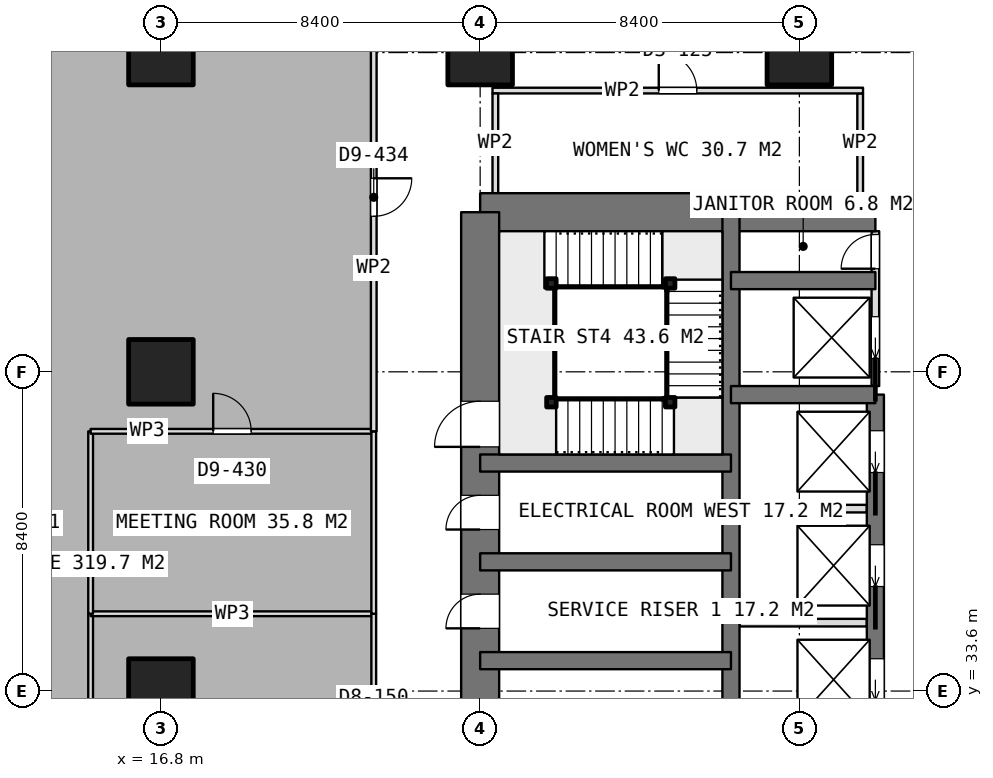
"""IFC4 building model, lengths in metres.
Left out: names, types, materials, properties, quantities, classifications, styles, units other than length and angle.
Written with IfcOpenShell. Run it as: python <this file> out.ifc"""

import sys

from ifc_helpers import new_model, si_unit, direction, frame, frame_2d, origin, origin_2d, place, context, subcontext, project, spatial, rectangle, extrude, element, fill, save


model = new_model("IFC4")
c1 = context("Model", 3, precision=1e-05, world=origin(), true_north=direction((0.0, 1.0)))
c2 = subcontext(c1, "Body", "Model", "MODEL_VIEW")
j1 = project(units=[si_unit("LENGTHUNIT", "METRE"), si_unit("PLANEANGLEUNIT", "RADIAN")], contexts=[c1])
p1 = place(None, origin())
s1 = spatial("IfcSite", under=j1, at=p1, CompositionType="ELEMENT")
p2 = place(p1, origin())
s2 = spatial("IfcBuilding", under=s1, at=p2, CompositionType="ELEMENT")
p3 = place(p2, frame((0.0, 0.0, 117.8)))
s3 = spatial("IfcBuildingStorey", under=s2, at=p3, CompositionType="ELEMENT", Elevation=117.8)
p4 = place(p3, frame((25.2, 46.2, 0.0), z_axis=(0.0, 0.0, 1.0), x_axis=(1.0, 0.0, 0.0)))
e1 = element("IfcWall", 1, at=p4, inside=s3, PredefinedType="SHEAR", context=c2, shape_type="SweptSolid", body=[
    extrude(rectangle(XDim=10.4, YDim=1.0, at=frame_2d((5.2, 0.0))), origin(), (0.0, 0.0, 1.0), 3.75),
])
p5 = place(p3, frame((25.2, 21.0, 0.0), z_axis=(0.0, 0.0, 1.0), x_axis=(0.0, 1.0, 0.0)))
e2 = element("IfcWall", 2, at=p5, inside=s3, PredefinedType="SHEAR", context=c2, shape_type="SweptSolid", body=[
    extrude(rectangle(XDim=25.2, YDim=1.0, at=frame_2d((12.6, 0.0))), origin(), (0.0, 0.0, 1.0), 3.75),
])
p6 = place(p5, frame((7.8, 0.0, 0.0)))
e3 = element("IfcOpeningElement", 3, at=p6, cuts=e2, PredefinedType="OPENING", context=c2, shape_type="SweptSolid", body=[
    extrude(rectangle(XDim=1.2, YDim=2.1, at=frame_2d((0.6, 1.05))), frame((0.0, 0.51, 0.0), z_axis=(0.0, -1.0, 0.0), x_axis=(1.0, 0.0, 0.0)), (0.0, 0.0, 1.0), 1.02),
])
p7 = place(p5, frame((14.25, 0.0, 0.0)))
e4 = element("IfcOpeningElement", 4, at=p7, cuts=e2, PredefinedType="OPENING", context=c2, shape_type="SweptSolid", body=[
    extrude(rectangle(XDim=0.9, YDim=2.1, at=frame_2d((0.45, 1.05))), frame((0.0, 0.51, 0.0), z_axis=(0.0, -1.0, 0.0), x_axis=(1.0, 0.0, 0.0)), (0.0, 0.0, 1.0), 1.02),
])
p8 = place(p5, frame((16.85, 0.0, 0.0)))
e5 = element("IfcOpeningElement", 5, at=p8, cuts=e2, PredefinedType="OPENING", context=c2, shape_type="SweptSolid", body=[
    extrude(rectangle(XDim=0.9, YDim=2.1, at=frame_2d((0.45, 1.05))), frame((0.0, 0.51, 0.0), z_axis=(0.0, -1.0, 0.0), x_axis=(1.0, 0.0, 0.0)), (0.0, 0.0, 1.0), 1.02),
])
p9 = place(p5, frame((19.025, 0.0, 0.0)))
e6 = element("IfcOpeningElement", 6, at=p9, cuts=e2, PredefinedType="OPENING", context=c2, shape_type="SweptSolid", body=[
    extrude(rectangle(XDim=1.2, YDim=2.1, at=frame_2d((0.6, 1.05))), frame((0.0, 0.51, 0.0), z_axis=(0.0, -1.0, 0.0), x_axis=(1.0, 0.0, 0.0)), (0.0, 0.0, 1.0), 1.02),
])
p10 = place(p3, frame((31.8, 21.0, 0.0), z_axis=(0.0, 0.0, 1.0), x_axis=(0.0, 1.0, 0.0)))
e7 = element("IfcWall", 7, at=p10, inside=s3, PredefinedType="SHEAR", context=c2, shape_type="SweptSolid", body=[
    extrude(rectangle(XDim=25.2, YDim=0.45, at=frame_2d((12.6, 0.0))), origin(), (0.0, 0.0, 1.0), 3.75),
])
p11 = place(p3, frame((35.6, 23.4, 0.0), z_axis=(0.0, 0.0, 1.0), x_axis=(0.0, 1.0, 0.0)))
e8 = element("IfcWall", 8, at=p11, inside=s3, PredefinedType="SHEAR", context=c2, shape_type="SweptSolid", body=[
    extrude(rectangle(XDim=18.0, YDim=0.45, at=frame_2d((9.0, 0.0))), origin(), (0.0, 0.0, 1.0), 3.75),
])
p12 = place(p11, frame((0.95, 0.0, 0.0)))
e9 = element("IfcOpeningElement", 9, at=p12, cuts=e8, PredefinedType="OPENING", context=c2, shape_type="SweptSolid", body=[
    extrude(rectangle(XDim=1.1, YDim=2.1, at=frame_2d((0.55, 1.05))), frame((0.0, 0.235, 0.0), z_axis=(0.0, -1.0, 0.0), x_axis=(1.0, 0.0, 0.0)), (0.0, 0.0, 1.0), 0.47),
])
p13 = place(p11, frame((3.95, 0.0, 0.0)))
e10 = element("IfcOpeningElement", 10, at=p13, cuts=e8, PredefinedType="OPENING", context=c2, shape_type="SweptSolid", body=[
    extrude(rectangle(XDim=1.1, YDim=2.1, at=frame_2d((0.55, 1.05))), frame((0.0, 0.235, 0.0), z_axis=(0.0, -1.0, 0.0), x_axis=(1.0, 0.0, 0.0)), (0.0, 0.0, 1.0), 0.47),
])
p14 = place(p11, frame((6.95, 0.0, 0.0)))
e11 = element("IfcOpeningElement", 11, at=p14, cuts=e8, PredefinedType="OPENING", context=c2, shape_type="SweptSolid", body=[
    extrude(rectangle(XDim=1.1, YDim=2.1, at=frame_2d((0.55, 1.05))), frame((0.0, 0.235, 0.0), z_axis=(0.0, -1.0, 0.0), x_axis=(1.0, 0.0, 0.0)), (0.0, 0.0, 1.0), 0.47),
])
p15 = place(p11, frame((9.95, 0.0, 0.0)))
e12 = element("IfcOpeningElement", 12, at=p15, cuts=e8, PredefinedType="OPENING", context=c2, shape_type="SweptSolid", body=[
    extrude(rectangle(XDim=1.1, YDim=2.1, at=frame_2d((0.55, 1.05))), frame((0.0, 0.235, 0.0), z_axis=(0.0, -1.0, 0.0), x_axis=(1.0, 0.0, 0.0)), (0.0, 0.0, 1.0), 0.47),
])
p16 = place(p11, frame((12.95, 0.0, 0.0)))
e13 = element("IfcOpeningElement", 13, at=p16, cuts=e8, PredefinedType="OPENING", context=c2, shape_type="SweptSolid", body=[
    extrude(rectangle(XDim=1.1, YDim=2.1, at=frame_2d((0.55, 1.05))), frame((0.0, 0.235, 0.0), z_axis=(0.0, -1.0, 0.0), x_axis=(1.0, 0.0, 0.0)), (0.0, 0.0, 1.0), 0.47),
])
p17 = place(p11, frame((15.95, 0.0, 0.0)))
e14 = element("IfcOpeningElement", 14, at=p17, cuts=e8, PredefinedType="OPENING", context=c2, shape_type="SweptSolid", body=[
    extrude(rectangle(XDim=1.1, YDim=2.1, at=frame_2d((0.55, 1.05))), frame((0.0, 0.235, 0.0), z_axis=(0.0, -1.0, 0.0), x_axis=(1.0, 0.0, 0.0)), (0.0, 0.0, 1.0), 0.47),
])
for number, where, z_axis, x_axis in (
    (15, (31.8, 41.4, 0.0), (0.0, 0.0, 1.0), (1.0, 0.0, 0.0)),
    (16, (31.8, 44.4, 0.0), (0.0, 0.0, 1.0), (1.0, 0.0, 0.0)),
):
    element("IfcWall", number, at=place(p3, frame(where, z_axis=z_axis, x_axis=x_axis)), inside=s3, PredefinedType="SHEAR", context=c2, shape_type="SweptSolid", body=[
        extrude(rectangle(XDim=3.8, YDim=0.45, at=frame_2d((1.9, 0.0))), origin(), (0.0, 0.0, 1.0), 3.75),
    ])
for number, where, z_axis, x_axis in (
    (17, (25.2, 34.4, 0.0), (0.0, 0.0, 1.0), (1.0, 0.0, 0.0)),
    (18, (25.2, 37.0, 0.0), (0.0, 0.0, 1.0), (1.0, 0.0, 0.0)),
    (19, (25.2, 39.6, 0.0), (0.0, 0.0, 1.0), (1.0, 0.0, 0.0)),
):
    element("IfcWall", number, at=place(p3, frame(where, z_axis=z_axis, x_axis=x_axis)), inside=s3, PredefinedType="SHEAR", context=c2, shape_type="SweptSolid", body=[
        extrude(rectangle(XDim=6.6, YDim=0.45, at=frame_2d((3.3, 0.0))), origin(), (0.0, 0.0, 1.0), 3.75),
    ])
for number, where, z_axis, x_axis in (
    (20, (16.8, 33.6, 0.0), (0.0, 0.0, 1.0), (1.0, 0.0, 0.0)),
    (21, (16.8, 42.0, 0.0), (0.0, 0.0, 1.0), (1.0, 0.0, 0.0)),
    (22, (16.8, 50.4, 0.0), (0.0, 0.0, 1.0), (1.0, 0.0, 0.0)),
    (23, (25.2, 50.4, 0.0), (0.0, 0.0, 1.0), (1.0, 0.0, 0.0)),
    (24, (33.6, 50.4, 0.0), (0.0, 0.0, 1.0), (1.0, 0.0, 0.0)),
):
    element("IfcColumn", number, at=place(p3, frame(where, z_axis=z_axis, x_axis=x_axis)), inside=s3, PredefinedType="COLUMN", context=c2, shape_type="SweptSolid", body=[
        extrude(rectangle(XDim=1.7, YDim=1.7, at=origin_2d()), origin(), (0.0, 0.0, 1.0), 3.75),
    ])
for number, where, z_axis, x_axis in (
    (25, (32.025, 35.4, 0.0), (0.0, 0.0, 1.0), (1.0, 0.0, 0.0)),
    (26, (32.025, 38.4, 0.0), (0.0, 0.0, 1.0), (1.0, 0.0, 0.0)),
):
    element("IfcWall", number, at=place(p3, frame(where, z_axis=z_axis, x_axis=x_axis)), inside=s3, PredefinedType="PARTITIONING", context=c2, shape_type="SweptSolid", body=[
        extrude(rectangle(XDim=3.35, YDim=0.2, at=frame_2d((1.675, 0.0))), origin(), (0.0, 0.0, 1.0), 3.5),
    ])
p18 = place(p3, frame((35.6, 41.625, 0.0), z_axis=(0.0, 0.0, 1.0), x_axis=(0.0, 1.0, 0.0)))
e27 = element("IfcWall", 27, at=p18, inside=s3, PredefinedType="PARTITIONING", context=c2, shape_type="SweptSolid", body=[
    extrude(rectangle(XDim=4.075, YDim=0.2, at=frame_2d((2.038, 0.0))), origin(), (0.0, 0.0, 1.0), 3.5),
])
p19 = place(p18, frame((3.088, 0.0, 0.0)))
e28 = element("IfcOpeningElement", 28, at=p19, cuts=e27, PredefinedType="OPENING", context=c2, shape_type="SweptSolid", body=[
    extrude(rectangle(XDim=0.9, YDim=2.1, at=frame_2d((0.45, 1.05))), frame((0.0, 0.11, 0.0), z_axis=(0.0, -1.0, 0.0), x_axis=(1.0, 0.0, 0.0)), (0.0, 0.0, 1.0), 0.22),
])
p20 = place(p18, frame((0.725, 0.0, 0.0)))
e29 = element("IfcOpeningElement", 29, at=p20, cuts=e27, PredefinedType="OPENING", context=c2, shape_type="SweptSolid", body=[
    extrude(rectangle(XDim=1.1, YDim=2.1, at=frame_2d((0.55, 1.05))), frame((0.0, 0.11, 0.0), z_axis=(0.0, -1.0, 0.0), x_axis=(1.0, 0.0, 0.0)), (0.0, 0.0, 1.0), 0.22),
])
p21 = place(p3, frame((25.525, 49.4, 0.0), z_axis=(0.0, 0.0, 1.0), x_axis=(1.0, 0.0, 0.0)))
e30 = element("IfcWall", 30, at=p21, inside=s3, PredefinedType="PARTITIONING", context=c2, shape_type="SweptSolid", body=[
    extrude(rectangle(XDim=9.75, YDim=0.15, at=frame_2d((4.875, 0.0))), origin(), (0.0, 0.0, 1.0), 3.5),
])
p22 = place(p21, frame((4.375, 0.0, 0.0)))
e31 = element("IfcOpeningElement", 31, at=p22, cuts=e30, PredefinedType="OPENING", context=c2, shape_type="SweptSolid", body=[
    extrude(rectangle(XDim=1.0, YDim=2.1, at=frame_2d((0.5, 1.05))), frame((0.0, 0.085, 0.0), z_axis=(0.0, -1.0, 0.0), x_axis=(1.0, 0.0, 0.0)), (0.0, 0.0, 1.0), 0.17),
])
for number, where, z_axis, x_axis in (
    (32, (25.6, 46.7, 0.0), (0.0, 0.0, 1.0), (0.0, 1.0, 0.0)),
    (33, (35.2, 46.7, 0.0), (0.0, 0.0, 1.0), (0.0, 1.0, 0.0)),
):
    element("IfcWall", number, at=place(p3, frame(where, z_axis=z_axis, x_axis=x_axis)), inside=s3, PredefinedType="PARTITIONING", context=c2, shape_type="SweptSolid", body=[
        extrude(rectangle(XDim=2.625, YDim=0.15, at=frame_2d((1.312, 0.0))), origin(), (0.0, 0.0, 1.0), 3.5),
    ])
p23 = place(p3, frame((14.95, 28.0, 0.0), z_axis=(0.0, 0.0, 1.0), x_axis=(0.0, 1.0, 0.0)))
e34 = element("IfcWall", 34, at=p23, inside=s3, PredefinedType="PARTITIONING", context=c2, shape_type="SweptSolid", body=[
    extrude(rectangle(XDim=7.634, YDim=0.125, at=frame_2d((3.817, 0.0))), origin(), (0.0, 0.0, 1.0), 3.5),
])
p24 = place(p3, frame((14.95, 35.634, 0.0), z_axis=(0.0, 0.0, 1.0), x_axis=(1.0, 0.0, 0.0)))
e35 = element("IfcWall", 35, at=p24, inside=s3, PredefinedType="PARTITIONING", context=c2, shape_type="SweptSolid", body=[
    extrude(rectangle(XDim=7.45, YDim=0.125, at=frame_2d((3.725, 0.0))), origin(), (0.0, 0.0, 1.0), 3.5),
])
p25 = place(p3, frame((22.4, 35.634, 0.0), z_axis=(0.0, 0.0, 1.0), x_axis=(0.0, -1.0, 0.0)))
e36 = element("IfcWall", 36, at=p25, inside=s3, PredefinedType="PARTITIONING", context=c2, shape_type="SweptSolid", body=[
    extrude(rectangle(XDim=7.559, YDim=0.125, at=frame_2d((3.78, 0.0))), origin(), (0.0, 0.0, 1.0), 3.5),
])
p26 = place(p25, frame((2.917, 0.0, 0.0)))
e37 = element("IfcOpeningElement", 37, at=p26, cuts=e36, PredefinedType="OPENING", context=c2, shape_type="SweptSolid", body=[
    extrude(rectangle(XDim=1.8, YDim=2.1, at=frame_2d((0.9, 1.05))), frame((0.0, 0.073, 0.0), z_axis=(0.0, -1.0, 0.0), x_axis=(1.0, 0.0, 0.0)), (0.0, 0.0, 1.0), 0.145),
])
p27 = place(p3, frame((14.95, 35.634, 0.0), z_axis=(0.0, 0.0, 1.0), x_axis=(0.0, 1.0, 0.0)))
e38 = element("IfcWall", 38, at=p27, inside=s3, PredefinedType="PARTITIONING", context=c2, shape_type="SweptSolid", body=[
    extrude(rectangle(XDim=4.8, YDim=0.125, at=frame_2d((2.4, 0.0))), origin(), (0.0, 0.0, 1.0), 3.5),
])
p28 = place(p3, frame((14.95, 40.434, 0.0), z_axis=(0.0, 0.0, 1.0), x_axis=(1.0, 0.0, 0.0)))
e39 = element("IfcWall", 39, at=p28, inside=s3, PredefinedType="PARTITIONING", context=c2, shape_type="SweptSolid", body=[
    extrude(rectangle(XDim=7.45, YDim=0.125, at=frame_2d((3.725, 0.0))), origin(), (0.0, 0.0, 1.0), 3.5),
])
p29 = place(p28, frame((3.225, 0.0, 0.0)))
e40 = element("IfcOpeningElement", 40, at=p29, cuts=e39, PredefinedType="OPENING", context=c2, shape_type="SweptSolid", body=[
    extrude(rectangle(XDim=1.0, YDim=2.1, at=frame_2d((0.5, 1.05))), frame((0.0, 0.073, 0.0), z_axis=(0.0, -1.0, 0.0), x_axis=(1.0, 0.0, 0.0)), (0.0, 0.0, 1.0), 0.145),
])
p30 = place(p3, frame((22.4, 40.434, 0.0), z_axis=(0.0, 0.0, 1.0), x_axis=(0.0, -1.0, 0.0)))
e41 = element("IfcWall", 41, at=p30, inside=s3, PredefinedType="PARTITIONING", context=c2, shape_type="SweptSolid", body=[
    extrude(rectangle(XDim=4.8, YDim=0.125, at=frame_2d((2.4, 0.0))), origin(), (0.0, 0.0, 1.0), 3.5),
])
p31 = place(p3, frame((22.4, 52.75, 0.0), z_axis=(0.0, 0.0, 1.0), x_axis=(0.0, -1.0, 0.0)))
e42 = element("IfcWall", 42, at=p31, inside=s3, PredefinedType="PARTITIONING", context=c2, shape_type="SweptSolid", body=[
    extrude(rectangle(XDim=12.316, YDim=0.15, at=frame_2d((6.158, 0.0))), origin(), (0.0, 0.0, 1.0), 3.5),
])
p32 = place(p31, frame((5.658, 0.0, 0.0)))
e43 = element("IfcOpeningElement", 43, at=p32, cuts=e42, PredefinedType="OPENING", context=c2, shape_type="SweptSolid", body=[
    extrude(rectangle(XDim=1.0, YDim=2.1, at=frame_2d((0.5, 1.05))), frame((0.0, 0.085, 0.0), z_axis=(0.0, -1.0, 0.0), x_axis=(1.0, 0.0, 0.0)), (0.0, 0.0, 1.0), 0.17),
])
for number, where, z_axis, x_axis in (
    (44, (27.075, 41.2, 0.0), (0.0, 0.0, 1.0), (1.0, 0.0, 0.0)),
    (45, (30.2, 41.2, 0.0), (0.0, 0.0, 1.0), (1.0, 0.0, 0.0)),
    (46, (30.2, 44.325, 0.0), (0.0, 0.0, 1.0), (1.0, 0.0, 0.0)),
    (47, (27.075, 44.325, 0.0), (0.0, 0.0, 1.0), (1.0, 0.0, 0.0)),
):
    element("IfcColumn", number, at=place(p3, frame(where, z_axis=z_axis, x_axis=x_axis)), inside=s3, PredefinedType="COLUMN", context=c2, shape_type="SweptSolid", body=[
        extrude(rectangle(XDim=0.25, YDim=0.25, at=origin_2d()), origin(), (0.0, 0.0, 1.0), 3.75),
    ])
p33 = place(p7, origin())
e48 = element("IfcDoor", 48, at=p33, inside=s3, OperationType="SINGLE_SWING_LEFT", PredefinedType="DOOR", context=c2, shape_type="SweptSolid", body=[
    extrude(rectangle(XDim=0.9, YDim=2.1, at=frame_2d((0.45, 1.05))), frame((0.0, 0.025, 0.0), z_axis=(0.0, -1.0, 0.0), x_axis=(1.0, 0.0, 0.0)), (0.0, 0.0, 1.0), 0.05),
])
fill(e4, e48)
p34 = place(p8, origin())
e49 = element("IfcDoor", 49, at=p34, inside=s3, OperationType="SINGLE_SWING_LEFT", PredefinedType="DOOR", context=c2, shape_type="SweptSolid", body=[
    extrude(rectangle(XDim=0.9, YDim=2.1, at=frame_2d((0.45, 1.05))), frame((0.0, 0.025, 0.0), z_axis=(0.0, -1.0, 0.0), x_axis=(1.0, 0.0, 0.0)), (0.0, 0.0, 1.0), 0.05),
])
fill(e5, e49)
p35 = place(p19, origin())
e50 = element("IfcDoor", 50, at=p35, inside=s3, OperationType="SINGLE_SWING_LEFT", PredefinedType="DOOR", context=c2, shape_type="SweptSolid", body=[
    extrude(rectangle(XDim=0.9, YDim=2.1, at=frame_2d((0.45, 1.05))), frame((0.0, 0.025, 0.0), z_axis=(0.0, -1.0, 0.0), x_axis=(1.0, 0.0, 0.0)), (0.0, 0.0, 1.0), 0.05),
])
fill(e28, e50)
p36 = place(p15, origin())
e51 = element("IfcDoor", 51, at=p36, inside=s3, OperationType="SLIDING_TO_LEFT", PredefinedType="USERDEFINED", context=c2, shape_type="SweptSolid", body=[
    extrude(rectangle(XDim=1.1, YDim=2.1, at=frame_2d((0.55, 1.05))), frame((0.0, 0.025, 0.0), z_axis=(0.0, -1.0, 0.0), x_axis=(1.0, 0.0, 0.0)), (0.0, 0.0, 1.0), 0.05),
])
fill(e12, e51)
p37 = place(p16, origin())
e52 = element("IfcDoor", 52, at=p37, inside=s3, OperationType="SLIDING_TO_LEFT", PredefinedType="USERDEFINED", context=c2, shape_type="SweptSolid", body=[
    extrude(rectangle(XDim=1.1, YDim=2.1, at=frame_2d((0.55, 1.05))), frame((0.0, 0.025, 0.0), z_axis=(0.0, -1.0, 0.0), x_axis=(1.0, 0.0, 0.0)), (0.0, 0.0, 1.0), 0.05),
])
fill(e13, e52)
p38 = place(p17, origin())
e53 = element("IfcDoor", 53, at=p38, inside=s3, OperationType="SLIDING_TO_LEFT", PredefinedType="USERDEFINED", context=c2, shape_type="SweptSolid", body=[
    extrude(rectangle(XDim=1.1, YDim=2.1, at=frame_2d((0.55, 1.05))), frame((0.0, 0.025, 0.0), z_axis=(0.0, -1.0, 0.0), x_axis=(1.0, 0.0, 0.0)), (0.0, 0.0, 1.0), 0.05),
])
fill(e14, e53)
p39 = place(p20, origin())
e54 = element("IfcDoor", 54, at=p39, inside=s3, OperationType="SLIDING_TO_LEFT", PredefinedType="USERDEFINED", context=c2, shape_type="SweptSolid", body=[
    extrude(rectangle(XDim=1.1, YDim=2.1, at=frame_2d((0.55, 1.05))), frame((0.0, 0.025, 0.0), z_axis=(0.0, -1.0, 0.0), x_axis=(1.0, 0.0, 0.0)), (0.0, 0.0, 1.0), 0.05),
])
fill(e29, e54)
p40 = place(p22, origin())
e55 = element("IfcDoor", 55, at=p40, inside=s3, OperationType="SINGLE_SWING_LEFT", PredefinedType="DOOR", context=c2, shape_type="SweptSolid", body=[
    extrude(rectangle(XDim=1.0, YDim=2.1, at=frame_2d((0.5, 1.05))), frame((0.0, 0.025, 0.0), z_axis=(0.0, -1.0, 0.0), x_axis=(1.0, 0.0, 0.0)), (0.0, 0.0, 1.0), 0.05),
])
fill(e31, e55)
p41 = place(p29, origin())
e56 = element("IfcDoor", 56, at=p41, inside=s3, OperationType="SINGLE_SWING_LEFT", PredefinedType="DOOR", context=c2, shape_type="SweptSolid", body=[
    extrude(rectangle(XDim=1.0, YDim=2.1, at=frame_2d((0.5, 1.05))), frame((0.0, 0.025, 0.0), z_axis=(0.0, -1.0, 0.0), x_axis=(1.0, 0.0, 0.0)), (0.0, 0.0, 1.0), 0.05),
])
fill(e40, e56)
p42 = place(p32, origin())
e57 = element("IfcDoor", 57, at=p42, inside=s3, OperationType="SINGLE_SWING_LEFT", PredefinedType="DOOR", context=c2, shape_type="SweptSolid", body=[
    extrude(rectangle(XDim=1.0, YDim=2.1, at=frame_2d((0.5, 1.05))), frame((0.0, 0.025, 0.0), z_axis=(0.0, -1.0, 0.0), x_axis=(1.0, 0.0, 0.0)), (0.0, 0.0, 1.0), 0.05),
])
fill(e43, e57)
p43 = place(p9, origin())
e58 = element("IfcDoor", 58, at=p43, inside=s3, OperationType="SINGLE_SWING_RIGHT", PredefinedType="DOOR", context=c2, shape_type="SweptSolid", body=[
    extrude(rectangle(XDim=1.2, YDim=2.1, at=frame_2d((0.6, 1.05))), frame((0.0, 0.025, 0.0), z_axis=(0.0, -1.0, 0.0), x_axis=(1.0, 0.0, 0.0)), (0.0, 0.0, 1.0), 0.05),
])
fill(e6, e58)
save(model, sys.argv[1])
